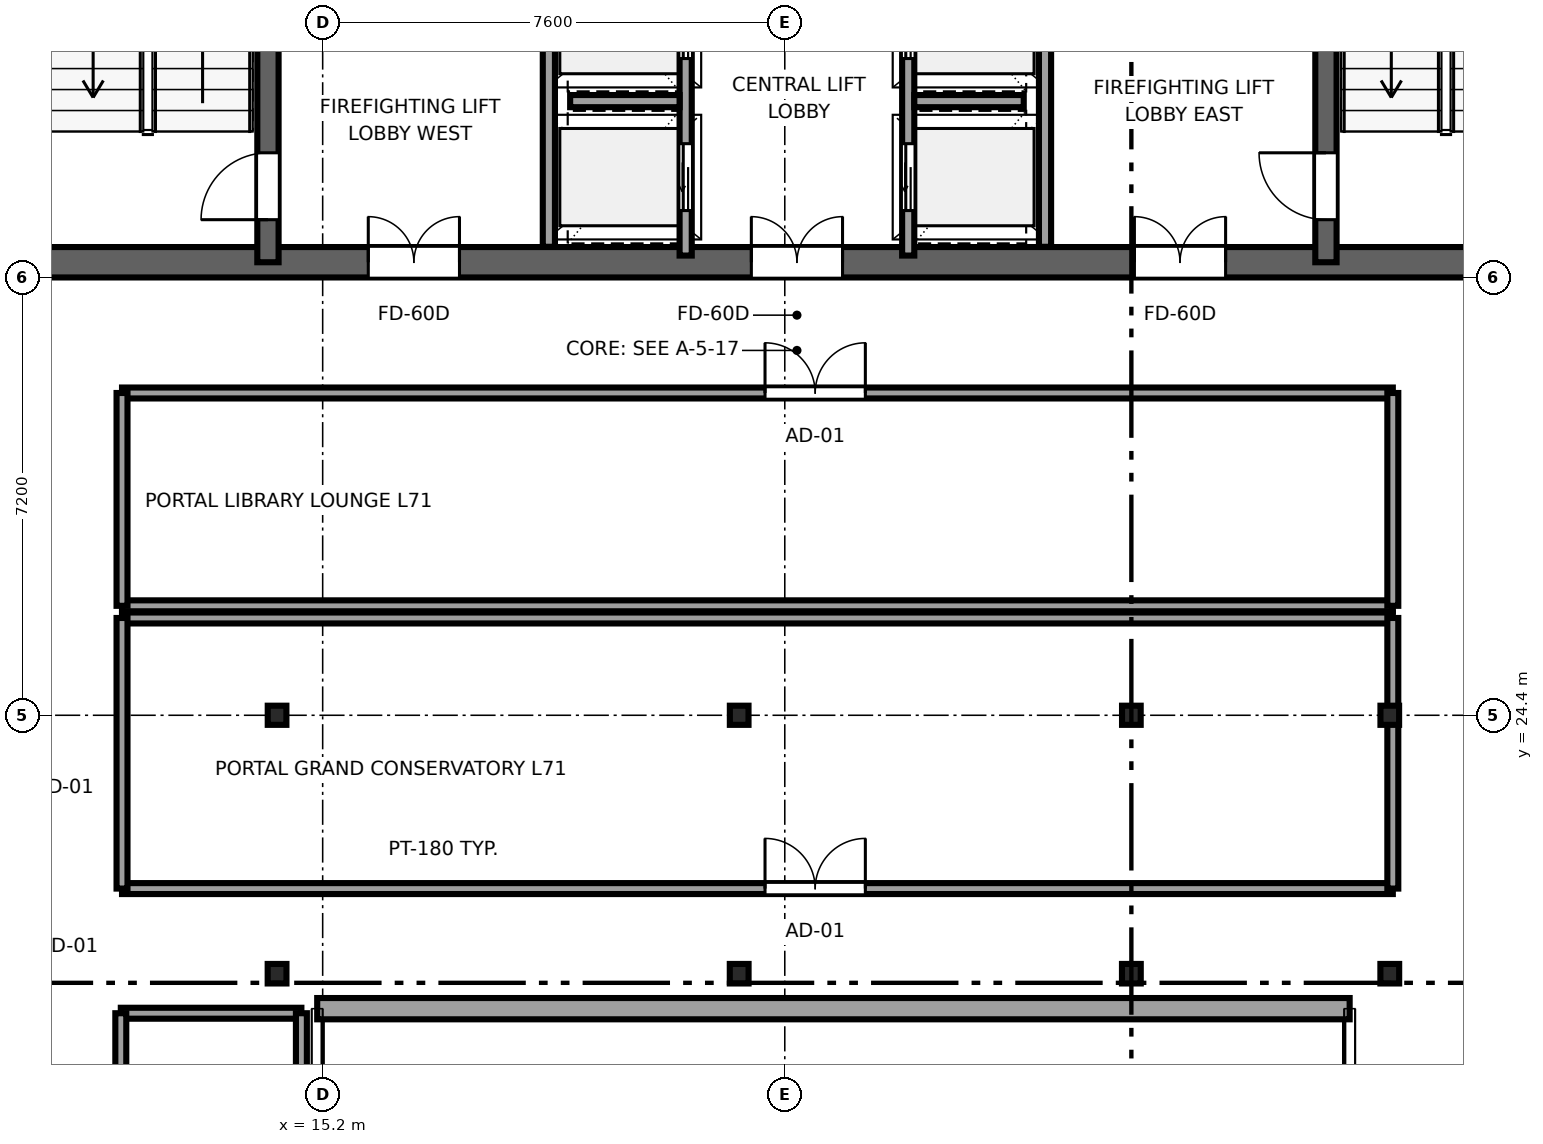
"""IFC4 building model, lengths in metres.
Left out: names, types, materials, properties, quantities, classifications, styles, units other than length and angle.
Written with IfcOpenShell. Run it as: python <this file> out.ifc"""

import sys

from ifc_helpers import new_model, si_unit, direction, frame, frame_2d, origin, origin_2d, place, context, subcontext, project, spatial, rectangle, i_section, extrude, source, transform, mapped, element, fill, save


model = new_model("IFC4")
c1 = context("Model", 3, precision=1e-05, world=origin(), true_north=direction((0.0, 1.0)))
c2 = subcontext(c1, "Body", "Model", "MODEL_VIEW")
j1 = project(units=[si_unit("LENGTHUNIT", "METRE"), si_unit("PLANEANGLEUNIT", "RADIAN")], contexts=[c1])
p1 = place(None, origin())
s1 = spatial("IfcSite", under=j1, at=p1, CompositionType="ELEMENT")
p2 = place(p1, origin())
s2 = spatial("IfcBuilding", under=s1, at=p2, CompositionType="ELEMENT")
p3 = place(p2, frame((0.0, 0.0, 266.5)))
s3 = spatial("IfcBuildingStorey", under=s2, at=p3, CompositionType="ELEMENT", Elevation=266.5)
p4 = place(p3, frame((10.0, 31.85, 0.0), z_axis=(0.0, 0.0, 1.0), x_axis=(1.0, 0.0, 0.0)))
e1 = element("IfcWall", 1, at=p4, inside=s3, PredefinedType="SHEAR", context=c2, shape_type="SweptSolid", body=[
    extrude(rectangle(XDim=26.0, YDim=0.5, at=frame_2d((13.0, 0.0))), origin(), (0.0, 0.0, 1.0), 3.55),
])
p5 = place(p4, frame((7.45, 0.0, 0.0), z_axis=(0.0, 0.0, 1.0), x_axis=(-1.0, 0.0, 0.0)))
e2 = element("IfcOpeningElement", 2, at=p5, cuts=e1, PredefinedType="OPENING", context=c2, shape_type="SweptSolid", body=[
    extrude(rectangle(XDim=1.5, YDim=2.04, at=frame_2d((0.75, 1.02))), frame((0.0, 0.26, 0.0), z_axis=(0.0, -1.0, 0.0), x_axis=(1.0, 0.0, 0.0)), (0.0, 0.0, 1.0), 0.52),
])
p6 = place(p4, frame((13.75, 0.0, 0.0), z_axis=(0.0, 0.0, 1.0), x_axis=(-1.0, 0.0, 0.0)))
e3 = element("IfcOpeningElement", 3, at=p6, cuts=e1, PredefinedType="OPENING", context=c2, shape_type="SweptSolid", body=[
    extrude(rectangle(XDim=1.5, YDim=2.04, at=frame_2d((0.75, 1.02))), frame((0.0, 0.26, 0.0), z_axis=(0.0, -1.0, 0.0), x_axis=(1.0, 0.0, 0.0)), (0.0, 0.0, 1.0), 0.52),
])
p7 = place(p4, frame((20.05, 0.0, 0.0), z_axis=(0.0, 0.0, 1.0), x_axis=(-1.0, 0.0, 0.0)))
e4 = element("IfcOpeningElement", 4, at=p7, cuts=e1, PredefinedType="OPENING", context=c2, shape_type="SweptSolid", body=[
    extrude(rectangle(XDim=1.5, YDim=2.04, at=frame_2d((0.75, 1.02))), frame((0.0, 0.26, 0.0), z_axis=(0.0, -1.0, 0.0), x_axis=(1.0, 0.0, 0.0)), (0.0, 0.0, 1.0), 0.52),
])
p8 = place(p3, frame((14.3, 31.85, 0.0), z_axis=(0.0, 0.0, 1.0), x_axis=(0.0, 1.0, 0.0)))
e5 = element("IfcWall", 5, at=p8, inside=s3, PredefinedType="SHEAR", context=c2, shape_type="SweptSolid", body=[
    extrude(rectangle(XDim=13.1, YDim=0.35, at=frame_2d((6.55, 0.0))), origin(), (0.0, 0.0, 1.0), 3.55),
])
p9 = place(p8, frame((0.7, 0.0, 0.0)))
e6 = element("IfcOpeningElement", 6, at=p9, cuts=e5, PredefinedType="OPENING", context=c2, shape_type="SweptSolid", body=[
    extrude(rectangle(XDim=1.1, YDim=2.12, at=frame_2d((0.55, 1.06))), frame((0.0, 0.185, 0.0), z_axis=(0.0, -1.0, 0.0), x_axis=(1.0, 0.0, 0.0)), (0.0, 0.0, 1.0), 0.37),
])
p10 = place(p3, frame((31.7, 31.85, 0.0), z_axis=(0.0, 0.0, 1.0), x_axis=(0.0, 1.0, 0.0)))
e7 = element("IfcWall", 7, at=p10, inside=s3, PredefinedType="SHEAR", context=c2, shape_type="SweptSolid", body=[
    extrude(rectangle(XDim=13.1, YDim=0.35, at=frame_2d((6.55, 0.0))), origin(), (0.0, 0.0, 1.0), 3.55),
])
p11 = place(p10, frame((1.8, 0.0, 0.0), z_axis=(0.0, 0.0, 1.0), x_axis=(-1.0, 0.0, 0.0)))
e8 = element("IfcOpeningElement", 8, at=p11, cuts=e7, PredefinedType="OPENING", context=c2, shape_type="SweptSolid", body=[
    extrude(rectangle(XDim=1.1, YDim=2.12, at=frame_2d((0.55, 1.06))), frame((0.0, 0.185, 0.0), z_axis=(0.0, -1.0, 0.0), x_axis=(1.0, 0.0, 0.0)), (0.0, 0.0, 1.0), 0.37),
])
m1 = source(origin(), c2, "Body", "SweptSolid", [
    extrude(i_section(OverallWidth=0.307, OverallDepth=0.315, WebThickness=0.012, FlangeThickness=0.019, FilletRadius=0.017, at=origin_2d()), origin(), (0.0, 0.0, 1.0), 3.55),
])
for number, where, z_axis, x_axis in (
    (9, (14.45, 24.4, 0.0), (0.0, 0.0, 1.0), (1.0, 0.0, 0.0)),
    (10, (22.05, 24.4, 0.0), (0.0, 0.0, 1.0), (1.0, 0.0, 0.0)),
    (11, (28.5, 24.4, 0.0), (0.0, 0.0, 1.0), (1.0, 0.0, 0.0)),
    (12, (32.75, 24.4, 0.0), (0.0, 0.0, 1.0), (1.0, 0.0, 0.0)),
):
    element("IfcColumn", number, at=place(p3, frame(where, z_axis=z_axis, x_axis=x_axis)), inside=s3, PredefinedType="COLUMN", context=c2, shape_type="MappedRepresentation", body=[
        mapped(m1, transform((0.0, 0.0, 0.0), x_axis=(1.0, 0.0, 0.0), y_axis=(0.0, 1.0, 0.0), z_axis=(0.0, 0.0, 1.0), scale=1.0)),
    ])
m2 = source(origin(), c2, "Body", "SweptSolid", [
    extrude(i_section(OverallWidth=0.309, OverallDepth=0.321, WebThickness=0.014, FlangeThickness=0.022, FilletRadius=0.017, at=origin_2d()), origin(), (0.0, 0.0, 1.0), 3.55),
])
for number, where, z_axis, x_axis in (
    (13, (14.45, 20.15, 0.0), (0.0, 0.0, 1.0), (1.0, 0.0, 0.0)),
    (14, (22.05, 20.15, 0.0), (0.0, 0.0, 1.0), (1.0, 0.0, 0.0)),
    (15, (28.5, 20.15, 0.0), (0.0, 0.0, 1.0), (1.0, 0.0, 0.0)),
    (16, (32.75, 20.15, 0.0), (0.0, 0.0, 1.0), (1.0, 0.0, 0.0)),
):
    element("IfcColumn", number, at=place(p3, frame(where, z_axis=z_axis, x_axis=x_axis)), inside=s3, PredefinedType="COLUMN", context=c2, shape_type="MappedRepresentation", body=[
        mapped(m2, transform((0.0, 0.0, 0.0), x_axis=(1.0, 0.0, 0.0), y_axis=(0.0, 1.0, 0.0), z_axis=(0.0, 0.0, 1.0), scale=1.0)),
    ])
p12 = place(p3, frame((15.11, 19.575, 0.0), z_axis=(0.0, 0.0, 1.0), x_axis=(1.0, 0.0, 0.0)))
e17 = element("IfcWall", 17, at=p12, inside=s3, PredefinedType="SOLIDWALL", context=c2, shape_type="SweptSolid", body=[
    extrude(rectangle(XDim=16.98, YDim=0.35, at=frame_2d((8.49, 0.0))), origin(), (0.0, 0.0, 1.0), 3.25),
])
for number, where, z_axis, x_axis in (
    (18, (18.92, 32.104, 0.0), (0.0, 0.0, 1.0), (0.0, 1.0, 0.0)),
    (19, (27.08, 32.104, 0.0), (0.0, 0.0, 1.0), (0.0, 1.0, 0.0)),
):
    element("IfcWall", number, at=place(p3, frame(where, z_axis=z_axis, x_axis=x_axis)), inside=s3, PredefinedType="SOLIDWALL", context=c2, shape_type="SweptSolid", body=[
        extrude(rectangle(XDim=4.046, YDim=0.2, at=frame_2d((2.023, 0.0))), origin(), (0.0, 0.0, 1.0), 3.25),
    ])
p13 = place(p3, frame((21.17, 31.96, 0.0), z_axis=(0.0, 0.0, 1.0), x_axis=(0.0, 1.0, 0.0)))
e20 = element("IfcWall", 20, at=p13, inside=s3, PredefinedType="SOLIDWALL", context=c2, shape_type="SweptSolid", body=[
    extrude(rectangle(XDim=5.08, YDim=0.2, at=frame_2d((2.54, 0.0))), origin(), (0.0, 0.0, 1.0), 3.25),
])
p14 = place(p13, frame((0.74, 0.0, 0.0)))
e21 = element("IfcOpeningElement", 21, at=p14, cuts=e20, PredefinedType="OPENING", context=c2, shape_type="SweptSolid", body=[
    extrude(rectangle(XDim=1.1, YDim=2.12, at=frame_2d((0.55, 1.06))), frame((0.0, 0.11, 0.0), z_axis=(0.0, -1.0, 0.0), x_axis=(1.0, 0.0, 0.0)), (0.0, 0.0, 1.0), 0.22),
])
p15 = place(p13, frame((3.24, 0.0, 0.0)))
e22 = element("IfcOpeningElement", 22, at=p15, cuts=e20, PredefinedType="OPENING", context=c2, shape_type="SweptSolid", body=[
    extrude(rectangle(XDim=1.1, YDim=2.12, at=frame_2d((0.55, 1.06))), frame((0.0, 0.11, 0.0), z_axis=(0.0, -1.0, 0.0), x_axis=(1.0, 0.0, 0.0)), (0.0, 0.0, 1.0), 0.22),
])
p16 = place(p3, frame((19.27, 34.5, 0.0), z_axis=(0.0, 0.0, 1.0), x_axis=(1.0, 0.0, 0.0)))
e23 = element("IfcWall", 23, at=p16, inside=s3, PredefinedType="SOLIDWALL", context=c2, shape_type="SweptSolid", body=[
    extrude(rectangle(XDim=1.8, YDim=0.2, at=frame_2d((0.9, 0.0))), origin(), (0.0, 0.0, 1.0), 3.25),
])
p17 = place(p3, frame((24.83, 31.96, 0.0), z_axis=(0.0, 0.0, 1.0), x_axis=(0.0, 1.0, 0.0)))
e24 = element("IfcWall", 24, at=p17, inside=s3, PredefinedType="SOLIDWALL", context=c2, shape_type="SweptSolid", body=[
    extrude(rectangle(XDim=5.08, YDim=0.2, at=frame_2d((2.54, 0.0))), origin(), (0.0, 0.0, 1.0), 3.25),
])
p18 = place(p17, frame((0.74, 0.0, 0.0)))
e25 = element("IfcOpeningElement", 25, at=p18, cuts=e24, PredefinedType="OPENING", context=c2, shape_type="SweptSolid", body=[
    extrude(rectangle(XDim=1.1, YDim=2.12, at=frame_2d((0.55, 1.06))), frame((0.0, 0.11, 0.0), z_axis=(0.0, -1.0, 0.0), x_axis=(1.0, 0.0, 0.0)), (0.0, 0.0, 1.0), 0.22),
])
p19 = place(p17, frame((3.24, 0.0, 0.0)))
e26 = element("IfcOpeningElement", 26, at=p19, cuts=e24, PredefinedType="OPENING", context=c2, shape_type="SweptSolid", body=[
    extrude(rectangle(XDim=1.1, YDim=2.12, at=frame_2d((0.55, 1.06))), frame((0.0, 0.11, 0.0), z_axis=(0.0, -1.0, 0.0), x_axis=(1.0, 0.0, 0.0)), (0.0, 0.0, 1.0), 0.22),
])
p20 = place(p3, frame((24.93, 34.5, 0.0), z_axis=(0.0, 0.0, 1.0), x_axis=(1.0, 0.0, 0.0)))
e27 = element("IfcWall", 27, at=p20, inside=s3, PredefinedType="SOLIDWALL", context=c2, shape_type="SweptSolid", body=[
    extrude(rectangle(XDim=1.8, YDim=0.2, at=frame_2d((0.9, 0.0))), origin(), (0.0, 0.0, 1.0), 3.25),
])
p21 = place(p3, frame((11.88, 19.5, 0.0), z_axis=(0.0, 0.0, 1.0), x_axis=(1.0, 0.0, 0.0)))
e28 = element("IfcWall", 28, at=p21, inside=s3, PredefinedType="PARTITIONING", context=c2, shape_type="SweptSolid", body=[
    extrude(rectangle(XDim=2.97, YDim=0.18, at=frame_2d((1.485, 0.0))), origin(), (0.0, 0.0, 1.0), 3.25),
])
p22 = place(p3, frame((11.88, 10.2, 0.0), z_axis=(0.0, 0.0, 1.0), x_axis=(0.0, 1.0, 0.0)))
e29 = element("IfcWall", 29, at=p22, inside=s3, PredefinedType="PARTITIONING", context=c2, shape_type="SweptSolid", body=[
    extrude(rectangle(XDim=9.3, YDim=0.18, at=frame_2d((4.65, 0.0))), origin(), (0.0, 0.0, 1.0), 3.25),
])
p23 = place(p22, frame((3.525, 0.0, 0.0)))
e30 = element("IfcOpeningElement", 30, at=p23, cuts=e29, PredefinedType="OPENING", context=c2, shape_type="SweptSolid", body=[
    extrude(rectangle(XDim=1.65, YDim=2.15, at=frame_2d((0.825, 1.075))), frame((0.0, 0.1, 0.0), z_axis=(0.0, -1.0, 0.0), x_axis=(1.0, 0.0, 0.0)), (0.0, 0.0, 1.0), 0.2),
])
p24 = place(p3, frame((14.85, 10.2, 0.0), z_axis=(0.0, 0.0, 1.0), x_axis=(0.0, 1.0, 0.0)))
e31 = element("IfcWall", 31, at=p24, inside=s3, PredefinedType="PARTITIONING", context=c2, shape_type="SweptSolid", body=[
    extrude(rectangle(XDim=9.3, YDim=0.18, at=frame_2d((4.65, 0.0))), origin(), (0.0, 0.0, 1.0), 3.25),
])
p25 = place(p3, frame((11.9, 21.55, 0.0), z_axis=(0.0, 0.0, 1.0), x_axis=(1.0, 0.0, 0.0)))
e32 = element("IfcWall", 32, at=p25, inside=s3, PredefinedType="PARTITIONING", context=c2, shape_type="SweptSolid", body=[
    extrude(rectangle(XDim=20.9, YDim=0.18, at=frame_2d((10.45, 0.0))), origin(), (0.0, 0.0, 1.0), 3.25),
])
p26 = place(p25, frame((10.575, 0.0, 0.0)))
e33 = element("IfcOpeningElement", 33, at=p26, cuts=e32, PredefinedType="OPENING", context=c2, shape_type="SweptSolid", body=[
    extrude(rectangle(XDim=1.65, YDim=2.15, at=frame_2d((0.825, 1.075))), frame((0.0, 0.1, 0.0), z_axis=(0.0, -1.0, 0.0), x_axis=(1.0, 0.0, 0.0)), (0.0, 0.0, 1.0), 0.2),
])
p27 = place(p3, frame((11.9, 26.0, 0.0), z_axis=(0.0, 0.0, 1.0), x_axis=(1.0, 0.0, 0.0)))
e34 = element("IfcWall", 34, at=p27, inside=s3, PredefinedType="PARTITIONING", context=c2, shape_type="SweptSolid", body=[
    extrude(rectangle(XDim=20.9, YDim=0.18, at=frame_2d((10.45, 0.0))), origin(), (0.0, 0.0, 1.0), 3.25),
])
p28 = place(p3, frame((11.9, 21.55, 0.0), z_axis=(0.0, 0.0, 1.0), x_axis=(0.0, 1.0, 0.0)))
e35 = element("IfcWall", 35, at=p28, inside=s3, PredefinedType="PARTITIONING", context=c2, shape_type="SweptSolid", body=[
    extrude(rectangle(XDim=4.45, YDim=0.18, at=frame_2d((2.225, 0.0))), origin(), (0.0, 0.0, 1.0), 3.25),
])
p29 = place(p3, frame((32.8, 21.55, 0.0), z_axis=(0.0, 0.0, 1.0), x_axis=(0.0, 1.0, 0.0)))
e36 = element("IfcWall", 36, at=p29, inside=s3, PredefinedType="PARTITIONING", context=c2, shape_type="SweptSolid", body=[
    extrude(rectangle(XDim=4.45, YDim=0.18, at=frame_2d((2.225, 0.0))), origin(), (0.0, 0.0, 1.0), 2.04),
])
p30 = place(p3, frame((11.9, 26.2, 0.0), z_axis=(0.0, 0.0, 1.0), x_axis=(1.0, 0.0, 0.0)))
e37 = element("IfcWall", 37, at=p30, inside=s3, PredefinedType="PARTITIONING", context=c2, shape_type="SweptSolid", body=[
    extrude(rectangle(XDim=20.9, YDim=0.18, at=frame_2d((10.45, 0.0))), origin(), (0.0, 0.0, 1.0), 3.25),
])
p31 = place(p3, frame((11.9, 29.7, 0.0), z_axis=(0.0, 0.0, 1.0), x_axis=(1.0, 0.0, 0.0)))
e38 = element("IfcWall", 38, at=p31, inside=s3, PredefinedType="PARTITIONING", context=c2, shape_type="SweptSolid", body=[
    extrude(rectangle(XDim=20.9, YDim=0.18, at=frame_2d((10.45, 0.0))), origin(), (0.0, 0.0, 1.0), 3.25),
])
p32 = place(p31, frame((10.575, 0.0, 0.0)))
e39 = element("IfcOpeningElement", 39, at=p32, cuts=e38, PredefinedType="OPENING", context=c2, shape_type="SweptSolid", body=[
    extrude(rectangle(XDim=1.65, YDim=2.15, at=frame_2d((0.825, 1.075))), frame((0.0, 0.1, 0.0), z_axis=(0.0, -1.0, 0.0), x_axis=(1.0, 0.0, 0.0)), (0.0, 0.0, 1.0), 0.2),
])
p33 = place(p3, frame((11.9, 26.2, 0.0), z_axis=(0.0, 0.0, 1.0), x_axis=(0.0, 1.0, 0.0)))
e40 = element("IfcWall", 40, at=p33, inside=s3, PredefinedType="PARTITIONING", context=c2, shape_type="SweptSolid", body=[
    extrude(rectangle(XDim=3.5, YDim=0.18, at=frame_2d((1.75, 0.0))), origin(), (0.0, 0.0, 1.0), 3.25),
])
p34 = place(p3, frame((32.8, 26.2, 0.0), z_axis=(0.0, 0.0, 1.0), x_axis=(0.0, 1.0, 0.0)))
e41 = element("IfcWall", 41, at=p34, inside=s3, PredefinedType="PARTITIONING", context=c2, shape_type="SweptSolid", body=[
    extrude(rectangle(XDim=3.5, YDim=0.18, at=frame_2d((1.75, 0.0))), origin(), (0.0, 0.0, 1.0), 2.04),
])
m3 = source(origin(), c2, "Body", "SweptSolid", [
    extrude(rectangle(XDim=1.1, YDim=2.12, at=frame_2d((0.55, 1.06))), frame((0.0, 0.025, 0.0), z_axis=(0.0, -1.0, 0.0), x_axis=(1.0, 0.0, 0.0)), (0.0, 0.0, 1.0), 0.05),
])
p35 = place(p9, origin())
e42 = element("IfcDoor", 42, at=p35, inside=s3, OperationType="SINGLE_SWING_LEFT", PredefinedType="DOOR", context=c2, shape_type="MappedRepresentation", body=[
    mapped(m3, transform((0.0, 0.0, 0.0), x_axis=(1.0, 0.0, 0.0), y_axis=(0.0, 1.0, 0.0), z_axis=(0.0, 0.0, 1.0), scale=1.0)),
])
fill(e6, e42)
p36 = place(p11, origin())
e43 = element("IfcDoor", 43, at=p36, inside=s3, OperationType="SINGLE_SWING_RIGHT", PredefinedType="DOOR", context=c2, shape_type="MappedRepresentation", body=[
    mapped(m3, transform((0.0, 0.0, 0.0), x_axis=(1.0, 0.0, 0.0), y_axis=(0.0, 1.0, 0.0), z_axis=(0.0, 0.0, 1.0), scale=1.0)),
])
fill(e8, e43)
m4 = source(origin(), c2, "Body", "SweptSolid", [
    extrude(rectangle(XDim=1.5, YDim=2.04, at=frame_2d((0.75, 1.02))), frame((0.0, 0.025, 0.0), z_axis=(0.0, -1.0, 0.0), x_axis=(1.0, 0.0, 0.0)), (0.0, 0.0, 1.0), 0.05),
])
p37 = place(p5, origin())
e44 = element("IfcDoor", 44, at=p37, inside=s3, OperationType="DOUBLE_DOOR_SINGLE_SWING", PredefinedType="DOOR", context=c2, shape_type="MappedRepresentation", body=[
    mapped(m4, transform((0.0, 0.0, 0.0), x_axis=(1.0, 0.0, 0.0), y_axis=(0.0, 1.0, 0.0), z_axis=(0.0, 0.0, 1.0), scale=1.0)),
])
fill(e2, e44)
p38 = place(p6, origin())
e45 = element("IfcDoor", 45, at=p38, inside=s3, OperationType="DOUBLE_DOOR_SINGLE_SWING", PredefinedType="DOOR", context=c2, shape_type="MappedRepresentation", body=[
    mapped(m4, transform((0.0, 0.0, 0.0), x_axis=(1.0, 0.0, 0.0), y_axis=(0.0, 1.0, 0.0), z_axis=(0.0, 0.0, 1.0), scale=1.0)),
])
fill(e3, e45)
p39 = place(p7, origin())
e46 = element("IfcDoor", 46, at=p39, inside=s3, OperationType="DOUBLE_DOOR_SINGLE_SWING", PredefinedType="DOOR", context=c2, shape_type="MappedRepresentation", body=[
    mapped(m4, transform((0.0, 0.0, 0.0), x_axis=(1.0, 0.0, 0.0), y_axis=(0.0, 1.0, 0.0), z_axis=(0.0, 0.0, 1.0), scale=1.0)),
])
fill(e4, e46)
m5 = source(origin(), c2, "Body", "SweptSolid", [
    extrude(rectangle(XDim=1.1, YDim=2.12, at=frame_2d((0.55, 1.06))), frame((0.0, 0.025, 0.0), z_axis=(0.0, -1.0, 0.0), x_axis=(1.0, 0.0, 0.0)), (0.0, 0.0, 1.0), 0.05),
])
p40 = place(p14, origin())
e47 = element("IfcDoor", 47, at=p40, inside=s3, OperationType="SLIDING_TO_LEFT", PredefinedType="DOOR", context=c2, shape_type="MappedRepresentation", body=[
    mapped(m5, transform((0.0, 0.0, 0.0), x_axis=(1.0, 0.0, 0.0), y_axis=(0.0, 1.0, 0.0), z_axis=(0.0, 0.0, 1.0), scale=1.0)),
])
fill(e21, e47)
p41 = place(p15, origin())
e48 = element("IfcDoor", 48, at=p41, inside=s3, OperationType="SLIDING_TO_RIGHT", PredefinedType="DOOR", context=c2, shape_type="MappedRepresentation", body=[
    mapped(m5, transform((0.0, 0.0, 0.0), x_axis=(1.0, 0.0, 0.0), y_axis=(0.0, 1.0, 0.0), z_axis=(0.0, 0.0, 1.0), scale=1.0)),
])
fill(e22, e48)
p42 = place(p18, origin())
e49 = element("IfcDoor", 49, at=p42, inside=s3, OperationType="SLIDING_TO_LEFT", PredefinedType="DOOR", context=c2, shape_type="MappedRepresentation", body=[
    mapped(m5, transform((0.0, 0.0, 0.0), x_axis=(1.0, 0.0, 0.0), y_axis=(0.0, 1.0, 0.0), z_axis=(0.0, 0.0, 1.0), scale=1.0)),
])
fill(e25, e49)
p43 = place(p19, origin())
e50 = element("IfcDoor", 50, at=p43, inside=s3, OperationType="SLIDING_TO_RIGHT", PredefinedType="DOOR", context=c2, shape_type="MappedRepresentation", body=[
    mapped(m5, transform((0.0, 0.0, 0.0), x_axis=(1.0, 0.0, 0.0), y_axis=(0.0, 1.0, 0.0), z_axis=(0.0, 0.0, 1.0), scale=1.0)),
])
fill(e26, e50)
m6 = source(origin(), c2, "Body", "SweptSolid", [
    extrude(rectangle(XDim=1.65, YDim=2.15, at=frame_2d((0.825, 1.075))), frame((0.0, 0.025, 0.0), z_axis=(0.0, -1.0, 0.0), x_axis=(1.0, 0.0, 0.0)), (0.0, 0.0, 1.0), 0.05),
])
p44 = place(p26, origin())
e51 = element("IfcDoor", 51, at=p44, inside=s3, OperationType="DOUBLE_DOOR_SINGLE_SWING", PredefinedType="DOOR", context=c2, shape_type="MappedRepresentation", body=[
    mapped(m6, transform((0.0, 0.0, 0.0), x_axis=(1.0, 0.0, 0.0), y_axis=(0.0, 1.0, 0.0), z_axis=(0.0, 0.0, 1.0), scale=1.0)),
])
fill(e33, e51)
p45 = place(p32, origin())
e52 = element("IfcDoor", 52, at=p45, inside=s3, OperationType="DOUBLE_DOOR_SINGLE_SWING", PredefinedType="DOOR", context=c2, shape_type="MappedRepresentation", body=[
    mapped(m6, transform((0.0, 0.0, 0.0), x_axis=(1.0, 0.0, 0.0), y_axis=(0.0, 1.0, 0.0), z_axis=(0.0, 0.0, 1.0), scale=1.0)),
])
fill(e39, e52)
save(model, sys.argv[1])
